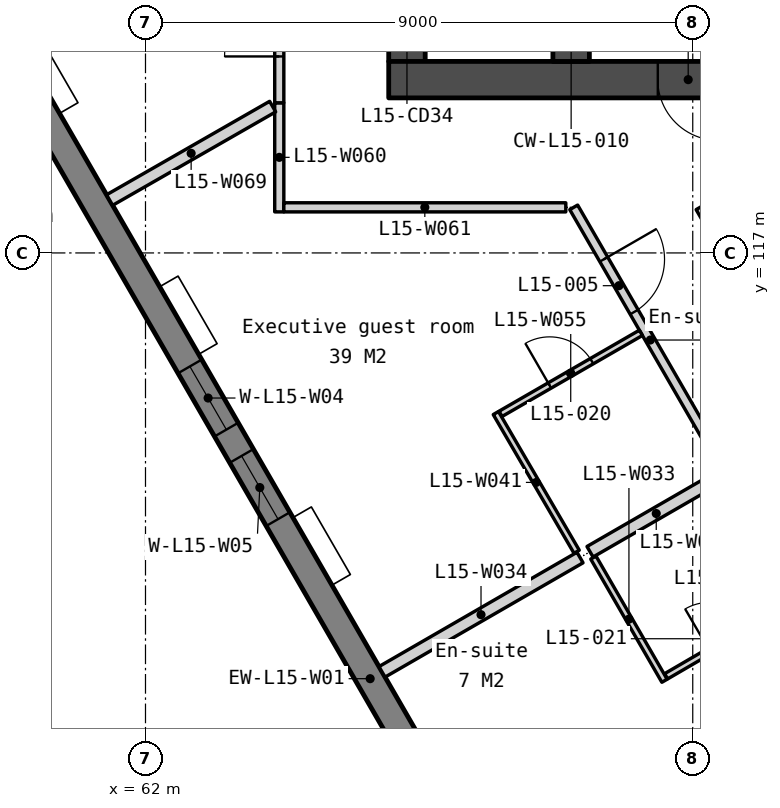
"""IFC4 building model, lengths in metres.
Left out: names, types, materials, properties, quantities, classifications, styles, units other than length and angle.
Written with IfcOpenShell. Run it as: python <this file> out.ifc"""

import sys

from ifc_helpers import new_model, si_unit, direction, frame, frame_2d, origin, place, context, subcontext, project, spatial, polyline, rectangle, outline, extrude, element, fill, save


model = new_model("IFC4")
c1 = context("Model", 3, precision=1e-05, world=origin(), true_north=direction((0.0, 1.0)))
c2 = subcontext(c1, "Body", "Model", "MODEL_VIEW")
j1 = project(units=[si_unit("LENGTHUNIT", "METRE"), si_unit("PLANEANGLEUNIT", "RADIAN")], contexts=[c1])
p1 = place(None, origin())
s1 = spatial("IfcSite", under=j1, at=p1, CompositionType="ELEMENT")
p2 = place(p1, origin())
s2 = spatial("IfcBuilding", under=s1, at=p2, CompositionType="ELEMENT")
p3 = place(p2, frame((0.0, 0.0, 66.5)))
s3 = spatial("IfcBuildingStorey", under=s2, at=p3, CompositionType="ELEMENT", Elevation=66.5)
p4 = place(p3, frame((66.3, 133.95, 0.0), z_axis=(0.0, 0.0, 1.0), x_axis=(0.0, -1.0, 0.0)))
e1 = element("IfcWall", 1, at=p4, inside=s3, PredefinedType="SOLIDWALL", context=c2, shape_type="SweptSolid", body=[
    extrude(rectangle(XDim=13.8, YDim=0.6, at=frame_2d((6.9, 0.0))), origin(), (0.0, 0.0, 1.0), 3.35),
])
p5 = place(p4, frame((0.6, 0.0, 0.0)))
e2 = element("IfcOpeningElement", 2, at=p5, cuts=e1, PredefinedType="OPENING", context=c2, shape_type="SweptSolid", body=[
    extrude(rectangle(XDim=1.1, YDim=2.1, at=frame_2d((0.55, 1.05))), frame((0.0, 0.31, 0.0), z_axis=(0.0, -1.0, 0.0), x_axis=(1.0, 0.0, 0.0)), (0.0, 0.0, 1.0), 0.62),
])
p6 = place(p4, frame((12.4, 0.0, 0.0)))
e3 = element("IfcOpeningElement", 3, at=p6, cuts=e1, PredefinedType="OPENING", context=c2, shape_type="SweptSolid", body=[
    extrude(rectangle(XDim=1.0, YDim=2.1, at=frame_2d((0.5, 1.05))), frame((0.0, 0.31, 0.0), z_axis=(0.0, -1.0, 0.0), x_axis=(1.0, 0.0, 0.0)), (0.0, 0.0, 1.0), 0.62),
])
p7 = place(p4, frame((8.5, 0.0, 0.0)))
e4 = element("IfcOpeningElement", 4, at=p7, cuts=e1, PredefinedType="OPENING", context=c2, shape_type="SweptSolid", body=[
    extrude(rectangle(XDim=1.0, YDim=2.1, at=frame_2d((0.5, 1.05))), frame((0.0, 0.31, 0.0), z_axis=(0.0, -1.0, 0.0), x_axis=(1.0, 0.0, 0.0)), (0.0, 0.0, 1.0), 0.62),
])
p8 = place(p4, frame((10.45, 0.0, 0.0)))
e5 = element("IfcOpeningElement", 5, at=p8, cuts=e1, PredefinedType="OPENING", context=c2, shape_type="SweptSolid", body=[
    extrude(rectangle(XDim=1.0, YDim=2.1, at=frame_2d((0.5, 1.05))), frame((0.0, 0.31, 0.0), z_axis=(0.0, -1.0, 0.0), x_axis=(1.0, 0.0, 0.0)), (0.0, 0.0, 1.0), 0.62),
])
p9 = place(p3, frame((66.0, 119.85, 0.0), z_axis=(0.0, 0.0, 1.0), x_axis=(1.0, 0.0, 0.0)))
e6 = element("IfcWall", 6, at=p9, inside=s3, PredefinedType="SOLIDWALL", context=c2, shape_type="SweptSolid", body=[
    extrude(rectangle(XDim=28.0, YDim=0.6, at=frame_2d((14.0, 0.0))), origin(), (0.0, 0.0, 1.0), 3.35),
])
p10 = place(p9, frame((6.825, 0.0, 0.0)))
e7 = element("IfcOpeningElement", 7, at=p10, cuts=e6, PredefinedType="OPENING", context=c2, shape_type="SweptSolid", body=[
    extrude(rectangle(XDim=1.8, YDim=2.1, at=frame_2d((0.9, 1.05))), frame((0.0, 0.31, 0.0), z_axis=(0.0, -1.0, 0.0), x_axis=(1.0, 0.0, 0.0)), (0.0, 0.0, 1.0), 0.62),
])
p11 = place(p9, frame((15.85, 0.0, 0.0)))
e8 = element("IfcOpeningElement", 8, at=p11, cuts=e6, PredefinedType="OPENING", context=c2, shape_type="SweptSolid", body=[
    extrude(rectangle(XDim=1.5, YDim=2.1, at=frame_2d((0.75, 1.05))), frame((0.0, 0.31, 0.0), z_axis=(0.0, -1.0, 0.0), x_axis=(1.0, 0.0, 0.0)), (0.0, 0.0, 1.0), 0.62),
])
p12 = place(p9, frame((19.375, 0.0, 0.0)))
e9 = element("IfcOpeningElement", 9, at=p12, cuts=e6, PredefinedType="OPENING", context=c2, shape_type="SweptSolid", body=[
    extrude(rectangle(XDim=1.8, YDim=2.1, at=frame_2d((0.9, 1.05))), frame((0.0, 0.31, 0.0), z_axis=(0.0, -1.0, 0.0), x_axis=(1.0, 0.0, 0.0)), (0.0, 0.0, 1.0), 0.62),
])
p13 = place(p9, frame((4.425, 0.0, 0.0)))
e10 = element("IfcOpeningElement", 10, at=p13, cuts=e6, PredefinedType="OPENING", context=c2, shape_type="SweptSolid", body=[
    extrude(rectangle(XDim=1.0, YDim=2.1, at=frame_2d((0.5, 1.05))), frame((0.0, 0.31, 0.0), z_axis=(0.0, -1.0, 0.0), x_axis=(1.0, 0.0, 0.0)), (0.0, 0.0, 1.0), 0.62),
])
p14 = place(p9, frame((9.925, 0.0, 0.0)))
e11 = element("IfcOpeningElement", 11, at=p14, cuts=e6, PredefinedType="OPENING", context=c2, shape_type="SweptSolid", body=[
    extrude(rectangle(XDim=1.0, YDim=2.1, at=frame_2d((0.5, 1.05))), frame((0.0, 0.31, 0.0), z_axis=(0.0, -1.0, 0.0), x_axis=(1.0, 0.0, 0.0)), (0.0, 0.0, 1.0), 0.62),
])
p15 = place(p9, frame((13.125, 0.0, 0.0)))
e12 = element("IfcOpeningElement", 12, at=p15, cuts=e6, PredefinedType="OPENING", context=c2, shape_type="SweptSolid", body=[
    extrude(rectangle(XDim=1.0, YDim=2.1, at=frame_2d((0.5, 1.05))), frame((0.0, 0.31, 0.0), z_axis=(0.0, -1.0, 0.0), x_axis=(1.0, 0.0, 0.0)), (0.0, 0.0, 1.0), 0.62),
])
p16 = place(p9, frame((21.725, 0.0, 0.0)))
e13 = element("IfcOpeningElement", 13, at=p16, cuts=e6, PredefinedType="OPENING", context=c2, shape_type="SweptSolid", body=[
    extrude(rectangle(XDim=1.0, YDim=2.1, at=frame_2d((0.5, 1.05))), frame((0.0, 0.31, 0.0), z_axis=(0.0, -1.0, 0.0), x_axis=(1.0, 0.0, 0.0)), (0.0, 0.0, 1.0), 0.62),
])
p17 = place(p9, frame((23.425, 0.0, 0.0)))
e14 = element("IfcOpeningElement", 14, at=p17, cuts=e6, PredefinedType="OPENING", context=c2, shape_type="SweptSolid", body=[
    extrude(rectangle(XDim=1.0, YDim=2.1, at=frame_2d((0.5, 1.05))), frame((0.0, 0.31, 0.0), z_axis=(0.0, -1.0, 0.0), x_axis=(1.0, 0.0, 0.0)), (0.0, 0.0, 1.0), 0.62),
])
p18 = place(p3, frame((69.0, 122.25, 0.0), z_axis=(0.0, 0.0, 1.0), x_axis=(0.0, -1.0, 0.0)))
e15 = element("IfcWall", 15, at=p18, inside=s3, PredefinedType="SOLIDWALL", context=c2, shape_type="SweptSolid", body=[
    extrude(rectangle(XDim=2.1, YDim=0.6, at=frame_2d((1.05, 0.0))), origin(), (0.0, 0.0, 1.0), 3.35),
])
p19 = place(p3, frame((54.495, 129.397, -0.15), z_axis=(0.0, 0.0, 1.0), x_axis=(0.499999201451, -0.866025864826, 0.0)))
e16 = element("IfcWall", 16, at=p19, inside=s3, PredefinedType="SOLIDWALL", context=c2, shape_type="SweptSolid", body=[
    extrude(outline(polyline([(44.8, 0.0), (44.8, 3.5), (0.0, 3.5), (0.0, 0.0), (44.8, 0.0)])), frame((0.0, 0.225, 0.0), z_axis=(0.0, -1.0, 0.0), x_axis=(1.0, 0.0, 0.0)), (0.0, 0.0, 1.0), 0.45),
])
p20 = place(p19, frame((0.722, 0.0, 1.05)))
e17 = element("IfcOpeningElement", 17, at=p20, cuts=e16, PredefinedType="OPENING", context=c2, shape_type="SweptSolid", body=[
    extrude(rectangle(XDim=1.2, YDim=1.5, at=frame_2d((0.6, 0.75))), frame((0.0, 0.235, 0.0), z_axis=(0.0, -1.0, 0.0), x_axis=(1.0, 0.0, 0.0)), (0.0, 0.0, 1.0), 0.47),
])
p21 = place(p19, frame((7.51, 0.0, 1.05)))
e18 = element("IfcOpeningElement", 18, at=p21, cuts=e16, PredefinedType="OPENING", context=c2, shape_type="SweptSolid", body=[
    extrude(rectangle(XDim=1.2, YDim=1.5, at=frame_2d((0.6, 0.75))), frame((0.0, 0.235, 0.0), z_axis=(0.0, -1.0, 0.0), x_axis=(1.0, 0.0, 0.0)), (0.0, 0.0, 1.0), 0.47),
])
p22 = place(p19, frame((9.21, 0.0, 1.05)))
e19 = element("IfcOpeningElement", 19, at=p22, cuts=e16, PredefinedType="OPENING", context=c2, shape_type="SweptSolid", body=[
    extrude(rectangle(XDim=1.2, YDim=1.5, at=frame_2d((0.6, 0.75))), frame((0.0, 0.235, 0.0), z_axis=(0.0, -1.0, 0.0), x_axis=(1.0, 0.0, 0.0)), (0.0, 0.0, 1.0), 0.47),
])
p23 = place(p19, frame((16.47, 0.0, 1.05)))
e20 = element("IfcOpeningElement", 20, at=p23, cuts=e16, PredefinedType="OPENING", context=c2, shape_type="SweptSolid", body=[
    extrude(rectangle(XDim=1.2, YDim=1.5, at=frame_2d((0.6, 0.75))), frame((0.0, 0.235, 0.0), z_axis=(0.0, -1.0, 0.0), x_axis=(1.0, 0.0, 0.0)), (0.0, 0.0, 1.0), 0.47),
])
p24 = place(p19, frame((18.17, 0.0, 1.05)))
e21 = element("IfcOpeningElement", 21, at=p24, cuts=e16, PredefinedType="OPENING", context=c2, shape_type="SweptSolid", body=[
    extrude(rectangle(XDim=1.2, YDim=1.5, at=frame_2d((0.6, 0.75))), frame((0.0, 0.235, 0.0), z_axis=(0.0, -1.0, 0.0), x_axis=(1.0, 0.0, 0.0)), (0.0, 0.0, 1.0), 0.47),
])
p25 = place(p19, frame((25.43, 0.0, 1.05)))
e22 = element("IfcOpeningElement", 22, at=p25, cuts=e16, PredefinedType="OPENING", context=c2, shape_type="SweptSolid", body=[
    extrude(rectangle(XDim=1.2, YDim=1.5, at=frame_2d((0.6, 0.75))), frame((0.0, 0.235, 0.0), z_axis=(0.0, -1.0, 0.0), x_axis=(1.0, 0.0, 0.0)), (0.0, 0.0, 1.0), 0.47),
])
p26 = place(p19, frame((27.13, 0.0, 1.05)))
e23 = element("IfcOpeningElement", 23, at=p26, cuts=e16, PredefinedType="OPENING", context=c2, shape_type="SweptSolid", body=[
    extrude(rectangle(XDim=1.2, YDim=1.5, at=frame_2d((0.6, 0.75))), frame((0.0, 0.235, 0.0), z_axis=(0.0, -1.0, 0.0), x_axis=(1.0, 0.0, 0.0)), (0.0, 0.0, 1.0), 0.47),
])
p27 = place(p19, frame((34.39, 0.0, 1.05)))
e24 = element("IfcOpeningElement", 24, at=p27, cuts=e16, PredefinedType="OPENING", context=c2, shape_type="SweptSolid", body=[
    extrude(rectangle(XDim=1.2, YDim=1.5, at=frame_2d((0.6, 0.75))), frame((0.0, 0.235, 0.0), z_axis=(0.0, -1.0, 0.0), x_axis=(1.0, 0.0, 0.0)), (0.0, 0.0, 1.0), 0.47),
])
p28 = place(p19, frame((36.09, 0.0, 1.05)))
e25 = element("IfcOpeningElement", 25, at=p28, cuts=e16, PredefinedType="OPENING", context=c2, shape_type="SweptSolid", body=[
    extrude(rectangle(XDim=1.2, YDim=1.5, at=frame_2d((0.6, 0.75))), frame((0.0, 0.235, 0.0), z_axis=(0.0, -1.0, 0.0), x_axis=(1.0, 0.0, 0.0)), (0.0, 0.0, 1.0), 0.47),
])
p29 = place(p19, frame((42.878, 0.0, 1.05)))
e26 = element("IfcOpeningElement", 26, at=p29, cuts=e16, PredefinedType="OPENING", context=c2, shape_type="SweptSolid", body=[
    extrude(rectangle(XDim=1.2, YDim=1.5, at=frame_2d((0.6, 0.75))), frame((0.0, 0.235, 0.0), z_axis=(0.0, -1.0, 0.0), x_axis=(1.0, 0.0, 0.0)), (0.0, 0.0, 1.0), 0.47),
])
p30 = place(p3, frame((68.13, 106.23, 0.0), z_axis=(0.0, 0.0, 1.0), x_axis=(0.86603151488, 0.499989415123, 0.0)))
e27 = element("IfcWall", 27, at=p30, inside=s3, PredefinedType="PARTITIONING", context=c2, shape_type="SweptSolid", body=[
    extrude(rectangle(XDim=6.465, YDim=0.2, at=frame_2d((3.232, 0.0))), origin(), (0.0, 0.0, 1.0), 3.35),
])
p31 = place(p3, frame((69.365, 111.99, 0.0), z_axis=(0.0, 0.0, 1.0), x_axis=(0.499999433879, -0.866025730634, 0.0)))
e28 = element("IfcWall", 28, at=p31, inside=s3, PredefinedType="PARTITIONING", context=c2, shape_type="SweptSolid", body=[
    extrude(rectangle(XDim=2.34, YDim=0.1, at=frame_2d((1.17, 0.0))), origin(), (0.0, 0.0, 1.0), 3.35),
])
p32 = place(p3, frame((65.89, 110.11, 0.0), z_axis=(0.0, 0.0, 1.0), x_axis=(0.866045024864, 0.499966013754, 0.0)))
e29 = element("IfcWall", 29, at=p32, inside=s3, PredefinedType="PARTITIONING", context=c2, shape_type="SweptSolid", body=[
    extrude(rectangle(XDim=3.76, YDim=0.2, at=frame_2d((1.88, 0.0))), origin(), (0.0, 0.0, 1.0), 3.35),
])
p33 = place(p3, frame((70.562, 110.037, 0.0), z_axis=(0.0, 0.0, 1.0), x_axis=(0.864132137734, 0.503264988386, 0.0)))
e30 = element("IfcWall", 30, at=p33, inside=s3, PredefinedType="PARTITIONING", context=c2, shape_type="SweptSolid", body=[
    extrude(rectangle(XDim=2.455, YDim=0.1, at=frame_2d((1.228, 0.0))), origin(), (0.0, 0.0, 1.0), 3.35),
])
p34 = place(p33, frame((0.827, 0.0, 0.0)))
e31 = element("IfcOpeningElement", 31, at=p34, cuts=e30, PredefinedType="OPENING", context=c2, shape_type="SweptSolid", body=[
    extrude(rectangle(XDim=0.8, YDim=2.1, at=frame_2d((0.4, 1.05))), frame((0.0, 0.06, 0.0), z_axis=(0.0, -1.0, 0.0), x_axis=(1.0, 0.0, 0.0)), (0.0, 0.0, 1.0), 0.12),
])
p35 = place(p3, frame((67.762, 114.367, 0.0), z_axis=(0.0, 0.0, 1.0), x_axis=(0.503163628445, -0.86419116115, 0.0)))
e32 = element("IfcWall", 32, at=p35, inside=s3, PredefinedType="PARTITIONING", context=c2, shape_type="SweptSolid", body=[
    extrude(rectangle(XDim=2.64, YDim=0.1, at=frame_2d((1.32, 0.0))), origin(), (0.0, 0.0, 1.0), 3.35),
])
p36 = place(p3, frame((69.311, 112.085, 0.0), z_axis=(0.0, 0.0, 1.0), x_axis=(0.866006140796, 0.500033362991, 0.0)))
e33 = element("IfcWall", 33, at=p36, inside=s3, PredefinedType="PARTITIONING", context=c2, shape_type="SweptSolid", body=[
    extrude(rectangle(XDim=2.515, YDim=0.2, at=frame_2d((1.257, 0.0))), origin(), (0.0, 0.0, 1.0), 3.35),
])
p37 = place(p3, frame((69.042, 117.75, 0.0), z_axis=(0.0, 0.0, 1.0), x_axis=(0.500004791531, -0.866022637375, 0.0)))
e34 = element("IfcWall", 34, at=p37, inside=s3, PredefinedType="PARTITIONING", context=c2, shape_type="SweptSolid", body=[
    extrude(rectangle(XDim=5.04, YDim=0.15, at=frame_2d((2.52, 0.0))), origin(), (0.0, 0.0, 1.0), 3.35),
])
p38 = place(p37, frame((0.988, 0.0, 0.0)))
e35 = element("IfcOpeningElement", 35, at=p38, cuts=e34, PredefinedType="OPENING", context=c2, shape_type="SweptSolid", body=[
    extrude(rectangle(XDim=1.0, YDim=2.1, at=frame_2d((0.5, 1.05))), frame((0.0, 0.085, 0.0), z_axis=(0.0, -1.0, 0.0), x_axis=(1.0, 0.0, 0.0)), (0.0, 0.0, 1.0), 0.17),
])
p39 = place(p3, frame((67.839, 114.354, 0.0), z_axis=(0.0, 0.0, 1.0), x_axis=(0.86601318911, 0.500021155841, 0.0)))
e36 = element("IfcWall", 36, at=p39, inside=s3, PredefinedType="PARTITIONING", context=c2, shape_type="SweptSolid", body=[
    extrude(rectangle(XDim=2.665, YDim=0.1, at=frame_2d((1.333, 0.0))), origin(), (0.0, 0.0, 1.0), 3.35),
])
p40 = place(p39, frame((0.933, 0.0, 0.0)))
e37 = element("IfcOpeningElement", 37, at=p40, cuts=e36, PredefinedType="OPENING", context=c2, shape_type="SweptSolid", body=[
    extrude(rectangle(XDim=0.8, YDim=2.1, at=frame_2d((0.4, 1.05))), frame((0.0, 0.06, 0.0), z_axis=(0.0, -1.0, 0.0), x_axis=(1.0, 0.0, 0.0)), (0.0, 0.0, 1.0), 0.12),
])
p41 = place(p3, frame((64.2, 117.675, 0.0), z_axis=(0.0, 0.0, 1.0), x_axis=(0.0, 1.0, 0.0)))
e38 = element("IfcWall", 38, at=p41, inside=s3, PredefinedType="PARTITIONING", context=c2, shape_type="SweptSolid", body=[
    extrude(rectangle(XDim=1.794, YDim=0.15, at=frame_2d((0.897, 0.0))), origin(), (0.0, 0.0, 1.0), 3.35),
])
p42 = place(p3, frame((64.275, 117.75, 0.0), z_axis=(0.0, 0.0, 1.0), x_axis=(1.0, 0.0, 0.0)))
e39 = element("IfcWall", 39, at=p42, inside=s3, PredefinedType="PARTITIONING", context=c2, shape_type="SweptSolid", body=[
    extrude(rectangle(XDim=4.637, YDim=0.15, at=frame_2d((2.319, 0.0))), origin(), (0.0, 0.0, 1.0), 3.35),
])
p43 = place(p3, frame((71.121, 117.75, 0.0), z_axis=(0.0, 0.0, 1.0), x_axis=(0.499997830002, -0.86602665663, 0.0)))
e40 = element("IfcWall", 40, at=p43, inside=s3, PredefinedType="PARTITIONING", context=c2, shape_type="SweptSolid", body=[
    extrude(rectangle(XDim=10.949, YDim=0.15, at=frame_2d((5.474, 0.0))), origin(), (0.0, 0.0, 1.0), 3.35),
])
p44 = place(p43, frame((5.024, 0.0, 0.0)))
e41 = element("IfcOpeningElement", 41, at=p44, cuts=e40, PredefinedType="OPENING", context=c2, shape_type="SweptSolid", body=[
    extrude(rectangle(XDim=0.9, YDim=2.1, at=frame_2d((0.45, 1.05))), frame((0.0, 0.085, 0.0), z_axis=(0.0, -1.0, 0.0), x_axis=(1.0, 0.0, 0.0)), (0.0, 0.0, 1.0), 0.17),
])
p45 = place(p3, frame((61.41, 117.87, 0.0), z_axis=(0.0, 0.0, 1.0), x_axis=(0.867566776681, 0.4973207094, 0.0)))
e42 = element("IfcWall", 42, at=p45, inside=s3, PredefinedType="PARTITIONING", context=c2, shape_type="SweptSolid", body=[
    extrude(rectangle(XDim=3.091, YDim=0.2, at=frame_2d((1.546, 0.0))), origin(), (0.0, 0.0, 1.0), 3.35),
])
p46 = place(p3, frame((64.2, 119.469, 0.0), z_axis=(0.0, 0.0, 1.0), x_axis=(0.0, 1.0, 0.0)))
e43 = element("IfcWall", 43, at=p46, inside=s3, PredefinedType="PARTITIONING", context=c2, shape_type="SweptSolid", body=[
    extrude(rectangle(XDim=2.425, YDim=0.15, at=frame_2d((1.212, 0.0))), origin(), (0.0, 0.0, 1.0), 3.35),
])
p47 = place(p46, frame((0.762, 0.0, 0.0)))
e44 = element("IfcOpeningElement", 44, at=p47, cuts=e43, PredefinedType="OPENING", context=c2, shape_type="SweptSolid", body=[
    extrude(rectangle(XDim=0.9, YDim=2.1, at=frame_2d((0.45, 1.05))), frame((0.0, 0.085, 0.0), z_axis=(0.0, -1.0, 0.0), x_axis=(1.0, 0.0, 0.0)), (0.0, 0.0, 1.0), 0.17),
])
p48 = place(p13, origin())
e45 = element("IfcDoor", 45, at=p48, inside=s3, OperationType="SINGLE_SWING_RIGHT", PredefinedType="DOOR", context=c2, shape_type="SweptSolid", body=[
    extrude(rectangle(XDim=1.0, YDim=2.1, at=frame_2d((0.5, 1.05))), frame((0.0, 0.025, 0.0), z_axis=(0.0, -1.0, 0.0), x_axis=(1.0, 0.0, 0.0)), (0.0, 0.0, 1.0), 0.05),
])
fill(e10, e45)
p49 = place(p23, origin())
e46 = element("IfcWindow", 46, at=p49, inside=s3, PartitioningType="SINGLE_PANEL", PredefinedType="WINDOW", context=c2, shape_type="SweptSolid", body=[
    extrude(rectangle(XDim=1.2, YDim=1.5, at=frame_2d((0.6, 0.75))), frame((0.0, 0.03, 0.0), z_axis=(0.0, -1.0, 0.0), x_axis=(1.0, 0.0, 0.0)), (0.0, 0.0, 1.0), 0.06),
])
fill(e20, e46)
p50 = place(p24, origin())
e47 = element("IfcWindow", 47, at=p50, inside=s3, PartitioningType="SINGLE_PANEL", PredefinedType="WINDOW", context=c2, shape_type="SweptSolid", body=[
    extrude(rectangle(XDim=1.2, YDim=1.5, at=frame_2d((0.6, 0.75))), frame((0.0, 0.03, 0.0), z_axis=(0.0, -1.0, 0.0), x_axis=(1.0, 0.0, 0.0)), (0.0, 0.0, 1.0), 0.06),
])
fill(e21, e47)
p51 = place(p47, origin())
e48 = element("IfcDoor", 48, at=p51, inside=s3, OperationType="SINGLE_SWING_LEFT", PredefinedType="DOOR", context=c2, shape_type="SweptSolid", body=[
    extrude(rectangle(XDim=0.9, YDim=2.1, at=frame_2d((0.45, 1.05))), frame((0.0, 0.025, 0.0), z_axis=(0.0, -1.0, 0.0), x_axis=(1.0, 0.0, 0.0)), (0.0, 0.0, 1.0), 0.05),
])
fill(e44, e48)
p52 = place(p38, origin())
e49 = element("IfcDoor", 49, at=p52, inside=s3, OperationType="SINGLE_SWING_LEFT", PredefinedType="DOOR", context=c2, shape_type="SweptSolid", body=[
    extrude(rectangle(XDim=1.0, YDim=2.1, at=frame_2d((0.5, 1.05))), frame((0.0, 0.025, 0.0), z_axis=(0.0, -1.0, 0.0), x_axis=(1.0, 0.0, 0.0)), (0.0, 0.0, 1.0), 0.05),
])
fill(e35, e49)
p53 = place(p40, origin())
e50 = element("IfcDoor", 50, at=p53, inside=s3, OperationType="SINGLE_SWING_LEFT", PredefinedType="DOOR", context=c2, shape_type="SweptSolid", body=[
    extrude(rectangle(XDim=0.8, YDim=2.1, at=frame_2d((0.4, 1.05))), frame((0.0, 0.025, 0.0), z_axis=(0.0, -1.0, 0.0), x_axis=(1.0, 0.0, 0.0)), (0.0, 0.0, 1.0), 0.05),
])
fill(e37, e50)
save(model, sys.argv[1])
